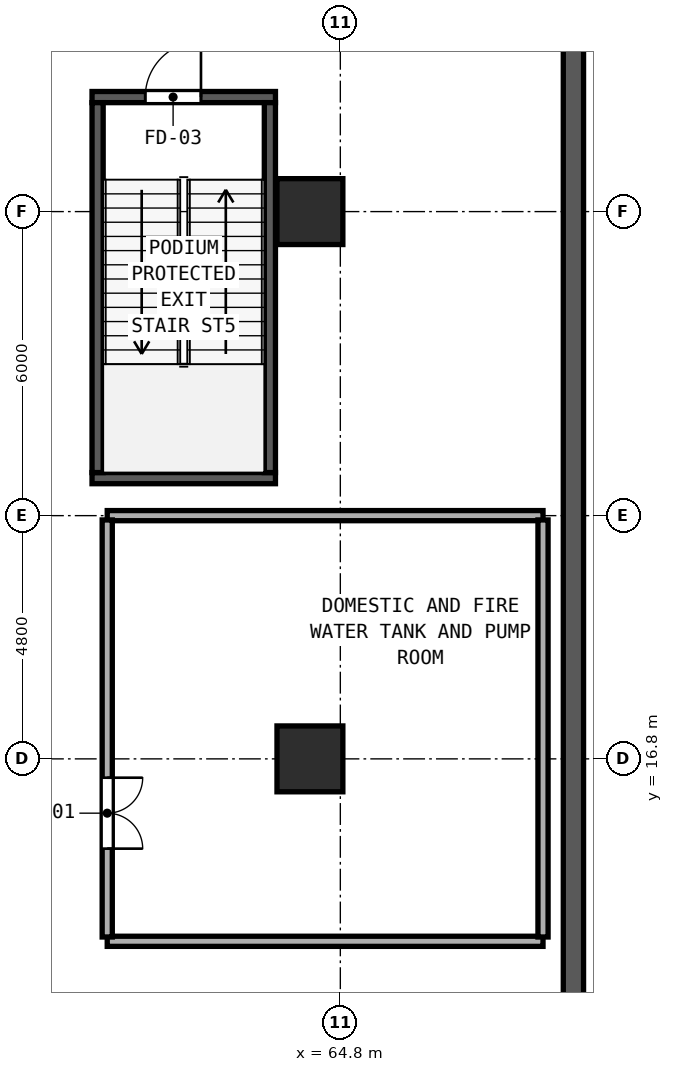
"""IFC4 building model, lengths in metres.
Left out: names, types, materials, properties, quantities, classifications, styles, units other than length and angle.
Written with IfcOpenShell. Run it as: python <this file> out.ifc"""

import sys

from ifc_helpers import new_model, si_unit, direction, frame, frame_2d, origin, origin_2d, place, context, subcontext, project, spatial, rectangle, hollow_rectangle, extrude, element, fill, save


model = new_model("IFC4")
c1 = context("Model", 3, precision=1e-05, world=origin(), true_north=direction((0.0, 1.0)))
c2 = subcontext(c1, "Body", "Model", "MODEL_VIEW")
j1 = project(units=[si_unit("LENGTHUNIT", "METRE"), si_unit("PLANEANGLEUNIT", "RADIAN")], contexts=[c1])
p1 = place(None, origin())
s1 = spatial("IfcSite", under=j1, at=p1, CompositionType="ELEMENT")
p2 = place(p1, origin())
s2 = spatial("IfcBuilding", under=s1, at=p2, CompositionType="ELEMENT")
p3 = place(p2, frame((0.0, 0.0, -9.6)))
s3 = spatial("IfcBuildingStorey", under=s2, at=p3, CompositionType="ELEMENT", Elevation=-9.6)
p4 = place(p3, frame((59.9, 29.86, 0.0), z_axis=(0.0, 0.0, 1.0), x_axis=(1.0, 0.0, 0.0)))
e1 = element("IfcWall", 1, at=p4, inside=s3, PredefinedType="SHEAR", context=c2, shape_type="SweptSolid", body=[
    extrude(rectangle(XDim=3.62, YDim=0.22, at=frame_2d((1.81, 0.0))), origin(), (0.0, 0.0, 1.0), 4.52),
])
p5 = place(p4, frame((1.05, 0.0, 0.0)))
e2 = element("IfcOpeningElement", 2, at=p5, cuts=e1, PredefinedType="OPENING", context=c2, shape_type="SweptSolid", body=[
    extrude(rectangle(XDim=1.1, YDim=2.15, at=frame_2d((0.55, 1.075))), frame((0.0, 0.12, 0.0), z_axis=(0.0, -1.0, 0.0), x_axis=(1.0, 0.0, 0.0)), (0.0, 0.0, 1.0), 0.24),
])
p6 = place(p3, frame((59.9, 22.34, 0.0), z_axis=(0.0, 0.0, 1.0), x_axis=(1.0, 0.0, 0.0)))
e3 = element("IfcWall", 3, at=p6, inside=s3, PredefinedType="SHEAR", context=c2, shape_type="SweptSolid", body=[
    extrude(rectangle(XDim=3.62, YDim=0.22, at=frame_2d((1.81, 0.0))), origin(), (0.0, 0.0, 1.0), 4.52),
])
for number, where, z_axis, x_axis in (
    (4, (60.01, 22.45, 0.0), (0.0, 0.0, 1.0), (0.0, 1.0, 0.0)),
    (5, (63.41, 22.45, 0.0), (0.0, 0.0, 1.0), (0.0, 1.0, 0.0)),
):
    element("IfcWall", number, at=place(p3, frame(where, z_axis=z_axis, x_axis=x_axis)), inside=s3, PredefinedType="SHEAR", context=c2, shape_type="SweptSolid", body=[
        extrude(rectangle(XDim=7.3, YDim=0.22, at=frame_2d((3.65, 0.0))), origin(), (0.0, 0.0, 1.0), 4.52),
    ])
p7 = place(p3, frame((69.4, 10.5, 0.0), z_axis=(0.0, 0.0, 1.0), x_axis=(0.0, 1.0, 0.0)))
e6 = element("IfcWall", 6, at=p7, inside=s3, PredefinedType="SOLIDWALL", context=c2, shape_type="SweptSolid", body=[
    extrude(rectangle(XDim=36.5, YDim=0.4, at=frame_2d((18.25, 0.0))), origin(), (0.0, 0.0, 1.0), 4.52),
])
for number, where, z_axis, x_axis in (
    (7, (64.2, 16.8, 0.0), (0.0, 0.0, 1.0), (1.0, 0.0, 0.0)),
    (8, (64.2, 27.6, 0.0), (0.0, 0.0, 1.0), (1.0, 0.0, 0.0)),
):
    element("IfcColumn", number, at=place(p3, frame(where, z_axis=z_axis, x_axis=x_axis)), inside=s3, PredefinedType="COLUMN", context=c2, shape_type="SweptSolid", body=[
        extrude(hollow_rectangle(XDim=1.3, YDim=1.3, WallThickness=0.048, at=origin_2d()), origin(), (0.0, 0.0, 1.0), 4.8),
    ])
for number, where, z_axis, x_axis in (
    (9, (60.2, 21.6, 0.0), (0.0, 0.0, 1.0), (1.0, 0.0, 0.0)),
    (10, (60.2, 13.2, 0.0), (0.0, 0.0, 1.0), (1.0, 0.0, 0.0)),
):
    element("IfcWall", number, at=place(p3, frame(where, z_axis=z_axis, x_axis=x_axis)), inside=s3, PredefinedType="SOLIDWALL", context=c2, shape_type="SweptSolid", body=[
        extrude(rectangle(XDim=8.6, YDim=0.2, at=frame_2d((4.3, 0.0))), origin(), (0.0, 0.0, 1.0), 4.52),
    ])
p8 = place(p3, frame((60.2, 13.285, 0.0), z_axis=(0.0, 0.0, 1.0), x_axis=(0.0, 1.0, 0.0)))
e11 = element("IfcWall", 11, at=p8, inside=s3, PredefinedType="SOLIDWALL", context=c2, shape_type="SweptSolid", body=[
    extrude(rectangle(XDim=8.23, YDim=0.2, at=frame_2d((4.115, 0.0))), origin(), (0.0, 0.0, 1.0), 4.52),
])
p9 = place(p8, frame((3.143, 0.0, 0.0), z_axis=(0.0, 0.0, 1.0), x_axis=(-1.0, 0.0, 0.0)))
e12 = element("IfcOpeningElement", 12, at=p9, cuts=e11, PredefinedType="OPENING", context=c2, shape_type="SweptSolid", body=[
    extrude(rectangle(XDim=1.4, YDim=2.2, at=frame_2d((0.7, 1.1))), frame((0.0, 0.11, 0.0), z_axis=(0.0, -1.0, 0.0), x_axis=(1.0, 0.0, 0.0)), (0.0, 0.0, 1.0), 0.22),
])
p10 = place(p3, frame((68.8, 13.285, 0.0), z_axis=(0.0, 0.0, 1.0), x_axis=(0.0, 1.0, 0.0)))
e13 = element("IfcWall", 13, at=p10, inside=s3, PredefinedType="SOLIDWALL", context=c2, shape_type="SweptSolid", body=[
    extrude(rectangle(XDim=8.23, YDim=0.2, at=frame_2d((4.115, 0.0))), origin(), (0.0, 0.0, 1.0), 4.52),
])
p11 = place(p5, origin())
e14 = element("IfcDoor", 14, at=p11, inside=s3, OperationType="SINGLE_SWING_RIGHT", PredefinedType="DOOR", context=c2, shape_type="SweptSolid", body=[
    extrude(rectangle(XDim=1.1, YDim=2.15, at=frame_2d((0.55, 1.075))), frame((0.0, 0.025, 0.0), z_axis=(0.0, -1.0, 0.0), x_axis=(1.0, 0.0, 0.0)), (0.0, 0.0, 1.0), 0.05),
])
fill(e2, e14)
p12 = place(p9, origin())
e15 = element("IfcDoor", 15, at=p12, inside=s3, OperationType="DOUBLE_DOOR_SINGLE_SWING", PredefinedType="DOOR", context=c2, shape_type="SweptSolid", body=[
    extrude(rectangle(XDim=1.4, YDim=2.2, at=frame_2d((0.7, 1.1))), frame((0.0, 0.025, 0.0), z_axis=(0.0, -1.0, 0.0), x_axis=(1.0, 0.0, 0.0)), (0.0, 0.0, 1.0), 0.05),
])
fill(e12, e15)
save(model, sys.argv[1])
